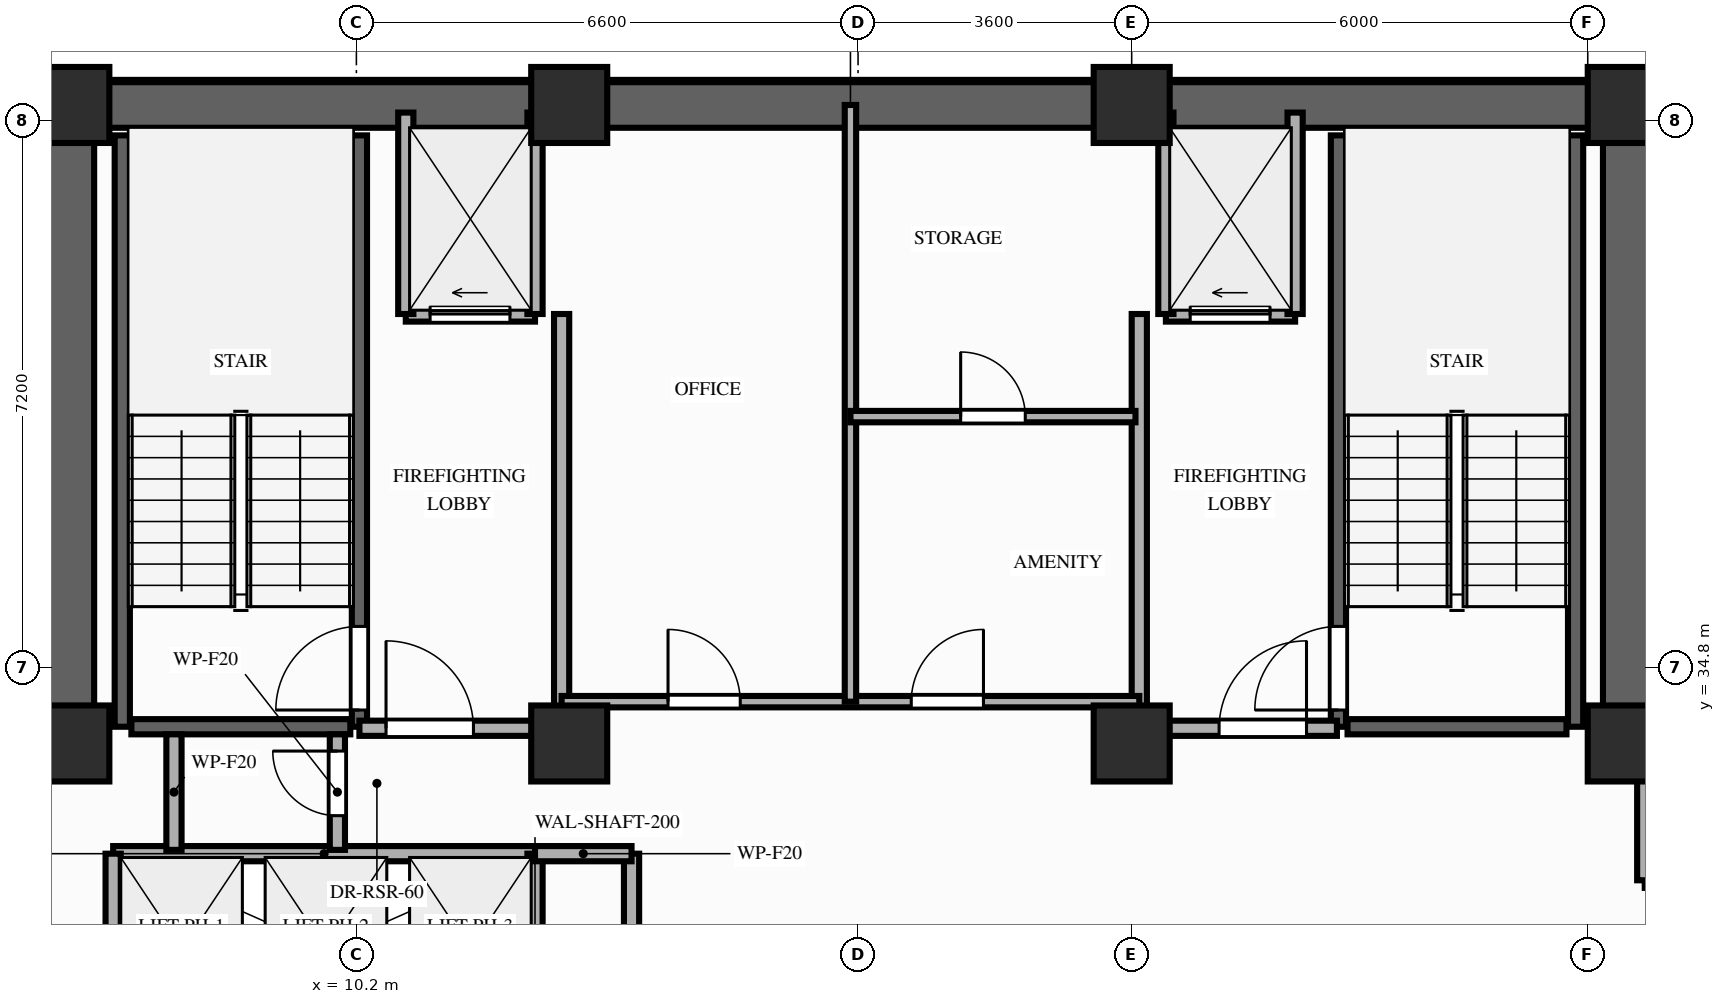
"""IFC4 building model, lengths in metres.
Left out: names, types, materials, properties, quantities, classifications, styles, units other than length and angle.
Written with IfcOpenShell. Run it as: python <this file> out.ifc"""

import sys

from ifc_helpers import new_model, si_unit, direction, frame, frame_2d, origin, origin_2d, place, context, subcontext, project, spatial, rectangle, extrude, element, fill, save


model = new_model("IFC4")
c1 = context("Model", 3, precision=1e-05, world=origin(), true_north=direction((0.0, 1.0)))
c2 = subcontext(c1, "Body", "Model", "MODEL_VIEW")
j1 = project(units=[si_unit("LENGTHUNIT", "METRE"), si_unit("PLANEANGLEUNIT", "RADIAN")], contexts=[c1])
p1 = place(None, origin())
s1 = spatial("IfcSite", under=j1, at=p1, CompositionType="ELEMENT")
p2 = place(p1, origin())
s2 = spatial("IfcBuilding", under=s1, at=p2, CompositionType="ELEMENT")
p3 = place(p2, frame((0.0, 0.0, 188.8)))
s3 = spatial("IfcBuildingStorey", under=s2, at=p3, CompositionType="ELEMENT", Elevation=188.8)
for number, where, z_axis, x_axis in (
    (1, (6.45, 33.8, 0.0), (0.0, 0.0, 1.0), (1.0, 0.0, 0.0)),
    (2, (13.0, 33.8, 0.0), (0.0, 0.0, 1.0), (1.0, 0.0, 0.0)),
    (3, (20.4, 33.8, 0.0), (0.0, 0.0, 1.0), (1.0, 0.0, 0.0)),
    (4, (26.9, 33.8, 0.0), (0.0, 0.0, 1.0), (1.0, 0.0, 0.0)),
    (5, (6.45, 42.2, 0.0), (0.0, 0.0, 1.0), (1.0, 0.0, 0.0)),
    (6, (13.0, 42.2, 0.0), (0.0, 0.0, 1.0), (1.0, 0.0, 0.0)),
    (7, (20.4, 42.2, 0.0), (0.0, 0.0, 1.0), (1.0, 0.0, 0.0)),
    (8, (26.9, 42.2, 0.0), (0.0, 0.0, 1.0), (1.0, 0.0, 0.0)),
):
    element("IfcColumn", number, at=place(p3, frame(where, z_axis=z_axis, x_axis=x_axis)), inside=s3, PredefinedType="COLUMN", context=c2, shape_type="SweptSolid", body=[
        extrude(rectangle(XDim=1.0, YDim=1.0, at=origin_2d()), origin(), (0.0, 0.0, 1.0), 3.2),
    ])
p4 = place(p3, frame((6.45, 42.2, 0.0), z_axis=(0.0, 0.0, 1.0), x_axis=(1.0, 0.0, 0.0)))
e9 = element("IfcWall", 9, at=p4, inside=s3, PredefinedType="SHEAR", context=c2, shape_type="SweptSolid", body=[
    extrude(rectangle(XDim=20.45, YDim=0.6, at=frame_2d((10.225, 0.0))), origin(), (0.0, 0.0, 1.0), 3.02),
])
for number, where, z_axis, x_axis in (
    (10, (6.45, 33.8, 0.0), (0.0, 0.0, 1.0), (0.0, 1.0, 0.0)),
    (11, (26.9, 33.8, 0.0), (0.0, 0.0, 1.0), (0.0, 1.0, 0.0)),
):
    element("IfcWall", number, at=place(p3, frame(where, z_axis=z_axis, x_axis=x_axis)), inside=s3, PredefinedType="SHEAR", context=c2, shape_type="SweptSolid", body=[
        extrude(rectangle(XDim=7.95, YDim=0.6, at=frame_2d((3.975, 0.0))), origin(), (0.0, 0.0, 1.0), 3.02),
    ])
p5 = place(p3, frame((7.12, 34.02, 0.0), z_axis=(0.0, 0.0, 1.0), x_axis=(0.0, 1.0, 0.0)))
e12 = element("IfcWall", 12, at=p5, inside=s3, PredefinedType="SHEAR", context=c2, shape_type="SweptSolid", body=[
    extrude(rectangle(XDim=7.78, YDim=0.2, at=frame_2d((3.89, 0.0))), origin(), (0.0, 0.0, 1.0), 3.02),
])
p6 = place(p3, frame((10.24, 34.02, 0.0), z_axis=(0.0, 0.0, 1.0), x_axis=(0.0, 1.0, 0.0)))
e13 = element("IfcWall", 13, at=p6, inside=s3, PredefinedType="SHEAR", context=c2, shape_type="SweptSolid", body=[
    extrude(rectangle(XDim=7.78, YDim=0.2, at=frame_2d((3.89, 0.0))), origin(), (0.0, 0.0, 1.0), 3.02),
])
p7 = place(p6, frame((0.22, 0.0, 0.0)))
e14 = element("IfcOpeningElement", 14, at=p7, cuts=e13, PredefinedType="OPENING", context=c2, shape_type="SweptSolid", body=[
    extrude(rectangle(XDim=1.1, YDim=2.15, at=frame_2d((0.55, 1.075))), frame((0.0, 0.11, 0.0), z_axis=(0.0, -1.0, 0.0), x_axis=(1.0, 0.0, 0.0)), (0.0, 0.0, 1.0), 0.22),
])
p8 = place(p3, frame((7.24, 34.02, 0.0), z_axis=(0.0, 0.0, 1.0), x_axis=(1.0, 0.0, 0.0)))
e15 = element("IfcWall", 15, at=p8, inside=s3, PredefinedType="SHEAR", context=c2, shape_type="SweptSolid", body=[
    extrude(rectangle(XDim=2.88, YDim=0.2, at=frame_2d((1.44, 0.0))), origin(), (0.0, 0.0, 1.0), 3.02),
])
p9 = place(p3, frame((23.12, 34.02, 0.0), z_axis=(0.0, 0.0, 1.0), x_axis=(0.0, 1.0, 0.0)))
e16 = element("IfcWall", 16, at=p9, inside=s3, PredefinedType="SHEAR", context=c2, shape_type="SweptSolid", body=[
    extrude(rectangle(XDim=7.78, YDim=0.2, at=frame_2d((3.89, 0.0))), origin(), (0.0, 0.0, 1.0), 3.02),
])
p10 = place(p9, frame((0.22, 0.0, 0.0)))
e17 = element("IfcOpeningElement", 17, at=p10, cuts=e16, PredefinedType="OPENING", context=c2, shape_type="SweptSolid", body=[
    extrude(rectangle(XDim=1.1, YDim=2.15, at=frame_2d((0.55, 1.075))), frame((0.0, 0.11, 0.0), z_axis=(0.0, -1.0, 0.0), x_axis=(1.0, 0.0, 0.0)), (0.0, 0.0, 1.0), 0.22),
])
p11 = place(p3, frame((26.24, 34.02, 0.0), z_axis=(0.0, 0.0, 1.0), x_axis=(0.0, 1.0, 0.0)))
e18 = element("IfcWall", 18, at=p11, inside=s3, PredefinedType="SHEAR", context=c2, shape_type="SweptSolid", body=[
    extrude(rectangle(XDim=7.78, YDim=0.2, at=frame_2d((3.89, 0.0))), origin(), (0.0, 0.0, 1.0), 3.02),
])
p12 = place(p3, frame((23.24, 34.02, 0.0), z_axis=(0.0, 0.0, 1.0), x_axis=(1.0, 0.0, 0.0)))
e19 = element("IfcWall", 19, at=p12, inside=s3, PredefinedType="SHEAR", context=c2, shape_type="SweptSolid", body=[
    extrude(rectangle(XDim=2.88, YDim=0.2, at=frame_2d((1.44, 0.0))), origin(), (0.0, 0.0, 1.0), 3.02),
])
p13 = place(p3, frame((7.0, 32.35, 0.0), z_axis=(0.0, 0.0, 1.0), x_axis=(1.0, 0.0, 0.0)))
e20 = element("IfcWall", 20, at=p13, inside=s3, PredefinedType="MOVABLE", context=c2, shape_type="SweptSolid", body=[
    extrude(rectangle(XDim=5.55, YDim=0.2, at=frame_2d((2.775, 0.0))), origin(), (0.0, 0.0, 1.0), 3.02),
])
for number, where, z_axis, x_axis in (
    (21, (7.0, 29.85, 0.0), (0.0, 0.0, 1.0), (0.0, 1.0, 0.0)),
    (22, (12.55, 29.85, 0.0), (0.0, 0.0, 1.0), (0.0, 1.0, 0.0)),
):
    element("IfcWall", number, at=place(p3, frame(where, z_axis=z_axis, x_axis=x_axis)), inside=s3, PredefinedType="MOVABLE", context=c2, shape_type="SweptSolid", body=[
        extrude(rectangle(XDim=2.5, YDim=0.2, at=frame_2d((1.25, 0.0))), origin(), (0.0, 0.0, 1.0), 3.02),
    ])
p14 = place(p3, frame((10.85, 39.45, 0.0), z_axis=(0.0, 0.0, 1.0), x_axis=(1.0, 0.0, 0.0)))
e23 = element("IfcWall", 23, at=p14, inside=s3, PredefinedType="MOVABLE", context=c2, shape_type="SweptSolid", body=[
    extrude(rectangle(XDim=1.7, YDim=0.2, at=frame_2d((0.85, 0.0))), origin(), (0.0, 0.0, 1.0), 3.02),
])
p15 = place(p14, frame((0.32, 0.0, 0.0)))
e24 = element("IfcOpeningElement", 24, at=p15, cuts=e23, PredefinedType="OPENING", context=c2, shape_type="SweptSolid", body=[
    extrude(rectangle(XDim=1.05, YDim=2.15, at=frame_2d((0.525, 1.075))), frame((0.0, 0.11, 0.0), z_axis=(0.0, -1.0, 0.0), x_axis=(1.0, 0.0, 0.0)), (0.0, 0.0, 1.0), 0.22),
])
p16 = place(p3, frame((20.85, 39.45, 0.0), z_axis=(0.0, 0.0, 1.0), x_axis=(1.0, 0.0, 0.0)))
e25 = element("IfcWall", 25, at=p16, inside=s3, PredefinedType="MOVABLE", context=c2, shape_type="SweptSolid", body=[
    extrude(rectangle(XDim=1.7, YDim=0.2, at=frame_2d((0.85, 0.0))), origin(), (0.0, 0.0, 1.0), 3.02),
])
p17 = place(p16, frame((0.32, 0.0, 0.0)))
e26 = element("IfcOpeningElement", 26, at=p17, cuts=e25, PredefinedType="OPENING", context=c2, shape_type="SweptSolid", body=[
    extrude(rectangle(XDim=1.05, YDim=2.15, at=frame_2d((0.525, 1.075))), frame((0.0, 0.11, 0.0), z_axis=(0.0, -1.0, 0.0), x_axis=(1.0, 0.0, 0.0)), (0.0, 0.0, 1.0), 0.22),
])
for number, where, z_axis, x_axis in (
    (27, (10.85, 39.45, 0.0), (0.0, 0.0, 1.0), (0.0, 1.0, 0.0)),
    (28, (12.55, 39.45, 0.0), (0.0, 0.0, 1.0), (0.0, 1.0, 0.0)),
):
    element("IfcWall", number, at=place(p3, frame(where, z_axis=z_axis, x_axis=x_axis)), inside=s3, PredefinedType="MOVABLE", context=c2, shape_type="SweptSolid", body=[
        extrude(rectangle(XDim=2.65, YDim=0.2, at=frame_2d((1.325, 0.0))), origin(), (0.0, 0.0, 1.0), 2.51),
    ])
p18 = place(p3, frame((12.9, 34.0, 0.0), z_axis=(0.0, 0.0, 1.0), x_axis=(0.0, 1.0, 0.0)))
e29 = element("IfcWall", 29, at=p18, inside=s3, PredefinedType="PARTITIONING", context=c2, shape_type="SweptSolid", body=[
    extrude(rectangle(XDim=5.45, YDim=0.2, at=frame_2d((2.725, 0.0))), origin(), (0.0, 0.0, 1.0), 2.51),
])
p19 = place(p3, frame((10.24, 34.0, 0.0), z_axis=(0.0, 0.0, 1.0), x_axis=(1.0, 0.0, 0.0)))
e30 = element("IfcWall", 30, at=p19, inside=s3, PredefinedType="PARTITIONING", context=c2, shape_type="SweptSolid", body=[
    extrude(rectangle(XDim=2.66, YDim=0.2, at=frame_2d((1.33, 0.0))), origin(), (0.0, 0.0, 1.0), 2.51),
])
p20 = place(p19, frame((0.35, 0.0, 0.0)))
e31 = element("IfcOpeningElement", 31, at=p20, cuts=e30, PredefinedType="OPENING", context=c2, shape_type="SweptSolid", body=[
    extrude(rectangle(XDim=1.15, YDim=2.15, at=frame_2d((0.575, 1.075))), frame((0.0, 0.11, 0.0), z_axis=(0.0, -1.0, 0.0), x_axis=(1.0, 0.0, 0.0)), (0.0, 0.0, 1.0), 0.22),
])
for number, where, z_axis, x_axis in (
    (32, (20.85, 39.45, 0.0), (0.0, 0.0, 1.0), (0.0, 1.0, 0.0)),
    (33, (22.55, 39.45, 0.0), (0.0, 0.0, 1.0), (0.0, 1.0, 0.0)),
):
    element("IfcWall", number, at=place(p3, frame(where, z_axis=z_axis, x_axis=x_axis)), inside=s3, PredefinedType="MOVABLE", context=c2, shape_type="SweptSolid", body=[
        extrude(rectangle(XDim=2.65, YDim=0.2, at=frame_2d((1.325, 0.0))), origin(), (0.0, 0.0, 1.0), 2.51),
    ])
p21 = place(p3, frame((20.5, 34.0, 0.0), z_axis=(0.0, 0.0, 1.0), x_axis=(0.0, 1.0, 0.0)))
e34 = element("IfcWall", 34, at=p21, inside=s3, PredefinedType="PARTITIONING", context=c2, shape_type="SweptSolid", body=[
    extrude(rectangle(XDim=5.45, YDim=0.2, at=frame_2d((2.725, 0.0))), origin(), (0.0, 0.0, 1.0), 2.51),
])
p22 = place(p3, frame((20.5, 34.0, 0.0), z_axis=(0.0, 0.0, 1.0), x_axis=(1.0, 0.0, 0.0)))
e35 = element("IfcWall", 35, at=p22, inside=s3, PredefinedType="PARTITIONING", context=c2, shape_type="SweptSolid", body=[
    extrude(rectangle(XDim=2.6, YDim=0.2, at=frame_2d((1.3, 0.0))), origin(), (0.0, 0.0, 1.0), 2.51),
])
p23 = place(p22, frame((1.05, 0.0, 0.0)))
e36 = element("IfcOpeningElement", 36, at=p23, cuts=e35, PredefinedType="OPENING", context=c2, shape_type="SweptSolid", body=[
    extrude(rectangle(XDim=1.15, YDim=2.15, at=frame_2d((0.575, 1.075))), frame((0.0, 0.11, 0.0), z_axis=(0.0, -1.0, 0.0), x_axis=(1.0, 0.0, 0.0)), (0.0, 0.0, 1.0), 0.22),
])
p24 = place(p3, frame((13.82, 29.85, 0.0), z_axis=(0.0, 0.0, 1.0), x_axis=(0.0, 1.0, 0.0)))
e37 = element("IfcWall", 37, at=p24, inside=s3, PredefinedType="PARTITIONING", context=c2, shape_type="SweptSolid", body=[
    extrude(rectangle(XDim=2.5, YDim=0.2, at=frame_2d((1.25, 0.0))), origin(), (0.0, 0.0, 1.0), 3.02),
])
p25 = place(p3, frame((12.55, 32.35, 0.0), z_axis=(0.0, 0.0, 1.0), x_axis=(1.0, 0.0, 0.0)))
e38 = element("IfcWall", 38, at=p25, inside=s3, PredefinedType="PARTITIONING", context=c2, shape_type="SweptSolid", body=[
    extrude(rectangle(XDim=1.27, YDim=0.2, at=frame_2d((0.635, 0.0))), origin(), (0.0, 0.0, 1.0), 3.02),
])
p26 = place(p3, frame((7.8, 32.4, 0.0), z_axis=(0.0, 0.0, 1.0), x_axis=(0.0, 1.0, 0.0)))
e39 = element("IfcWall", 39, at=p26, inside=s3, PredefinedType="PARTITIONING", context=c2, shape_type="SweptSolid", body=[
    extrude(rectangle(XDim=1.52, YDim=0.2, at=frame_2d((0.76, 0.0))), origin(), (0.0, 0.0, 1.0), 2.51),
])
p27 = place(p3, frame((9.95, 32.4, 0.0), z_axis=(0.0, 0.0, 1.0), x_axis=(0.0, 1.0, 0.0)))
e40 = element("IfcWall", 40, at=p27, inside=s3, PredefinedType="PARTITIONING", context=c2, shape_type="SweptSolid", body=[
    extrude(rectangle(XDim=1.52, YDim=0.2, at=frame_2d((0.76, 0.0))), origin(), (0.0, 0.0, 1.0), 2.51),
])
p28 = place(p27, frame((0.45, 0.0, 0.0)))
e41 = element("IfcOpeningElement", 41, at=p28, cuts=e40, PredefinedType="OPENING", context=c2, shape_type="SweptSolid", body=[
    extrude(rectangle(XDim=0.85, YDim=2.05, at=frame_2d((0.425, 1.025))), frame((0.0, 0.11, 0.0), z_axis=(0.0, -1.0, 0.0), x_axis=(1.0, 0.0, 0.0)), (0.0, 0.0, 1.0), 0.22),
])
p29 = place(p3, frame((12.9, 34.35, 0.0), z_axis=(0.0, 0.0, 1.0), x_axis=(1.0, 0.0, 0.0)))
e42 = element("IfcWall", 42, at=p29, inside=s3, PredefinedType="PARTITIONING", context=c2, shape_type="SweptSolid", body=[
    extrude(rectangle(XDim=7.6, YDim=0.15, at=frame_2d((3.8, 0.0))), origin(), (0.0, 0.0, 1.0), 3.02),
])
p30 = place(p29, frame((1.4, 0.0, 0.0)))
e43 = element("IfcOpeningElement", 43, at=p30, cuts=e42, PredefinedType="OPENING", context=c2, shape_type="SweptSolid", body=[
    extrude(rectangle(XDim=0.95, YDim=2.15, at=frame_2d((0.475, 1.075))), frame((0.0, 0.085, 0.0), z_axis=(0.0, -1.0, 0.0), x_axis=(1.0, 0.0, 0.0)), (0.0, 0.0, 1.0), 0.17),
])
p31 = place(p29, frame((4.6, 0.0, 0.0)))
e44 = element("IfcOpeningElement", 44, at=p31, cuts=e42, PredefinedType="OPENING", context=c2, shape_type="SweptSolid", body=[
    extrude(rectangle(XDim=0.95, YDim=2.15, at=frame_2d((0.475, 1.075))), frame((0.0, 0.085, 0.0), z_axis=(0.0, -1.0, 0.0), x_axis=(1.0, 0.0, 0.0)), (0.0, 0.0, 1.0), 0.17),
])
p32 = place(p3, frame((16.7, 34.35, 0.0), z_axis=(0.0, 0.0, 1.0), x_axis=(0.0, 1.0, 0.0)))
e45 = element("IfcWall", 45, at=p32, inside=s3, PredefinedType="PARTITIONING", context=c2, shape_type="SweptSolid", body=[
    extrude(rectangle(XDim=7.85, YDim=0.15, at=frame_2d((3.925, 0.0))), origin(), (0.0, 0.0, 1.0), 2.51),
])
p33 = place(p3, frame((16.7, 38.1, 0.0), z_axis=(0.0, 0.0, 1.0), x_axis=(1.0, 0.0, 0.0)))
e46 = element("IfcWall", 46, at=p33, inside=s3, PredefinedType="PARTITIONING", context=c2, shape_type="SweptSolid", body=[
    extrude(rectangle(XDim=3.75, YDim=0.15, at=frame_2d((1.875, 0.0))), origin(), (0.0, 0.0, 1.0), 3.02),
])
p34 = place(p33, frame((1.45, 0.0, 0.0)))
e47 = element("IfcOpeningElement", 47, at=p34, cuts=e46, PredefinedType="OPENING", context=c2, shape_type="SweptSolid", body=[
    extrude(rectangle(XDim=0.85, YDim=2.05, at=frame_2d((0.425, 1.025))), frame((0.0, 0.085, 0.0), z_axis=(0.0, -1.0, 0.0), x_axis=(1.0, 0.0, 0.0)), (0.0, 0.0, 1.0), 0.17),
])
p35 = place(p3, frame((27.15, 32.0, 0.0), z_axis=(0.0, 0.0, 1.0), x_axis=(1.0, 0.0, 0.0)))
e48 = element("IfcWall", 48, at=p35, inside=s3, PredefinedType="PARTITIONING", context=c2, shape_type="SweptSolid", body=[
    extrude(rectangle(XDim=9.45, YDim=0.2, at=frame_2d((4.725, 0.0))), origin(), (0.0, 0.0, 1.0), 2.51),
])
p36 = place(p35, frame((4.25, 0.0, 0.0)))
e49 = element("IfcOpeningElement", 49, at=p36, cuts=e48, PredefinedType="OPENING", context=c2, shape_type="SweptSolid", body=[
    extrude(rectangle(XDim=0.95, YDim=2.15, at=frame_2d((0.475, 1.075))), frame((0.0, 0.11, 0.0), z_axis=(0.0, -1.0, 0.0), x_axis=(1.0, 0.0, 0.0)), (0.0, 0.0, 1.0), 0.22),
])
p37 = place(p3, frame((27.15, 32.0, 0.0), z_axis=(0.0, 0.0, 1.0), x_axis=(0.0, 1.0, 0.0)))
e50 = element("IfcWall", 50, at=p37, inside=s3, PredefinedType="PARTITIONING", context=c2, shape_type="SweptSolid", body=[
    extrude(rectangle(XDim=1.68, YDim=0.2, at=frame_2d((0.84, 0.0))), origin(), (0.0, 0.0, 1.0), 2.51),
])
p38 = place(p7, origin())
e51 = element("IfcDoor", 51, at=p38, inside=s3, OperationType="SINGLE_SWING_LEFT", PredefinedType="DOOR", context=c2, shape_type="SweptSolid", body=[
    extrude(rectangle(XDim=1.1, YDim=2.15, at=frame_2d((0.55, 1.075))), frame((0.0, 0.025, 0.0), z_axis=(0.0, -1.0, 0.0), x_axis=(1.0, 0.0, 0.0)), (0.0, 0.0, 1.0), 0.05),
])
fill(e14, e51)
p39 = place(p10, origin())
e52 = element("IfcDoor", 52, at=p39, inside=s3, OperationType="SINGLE_SWING_LEFT", PredefinedType="DOOR", context=c2, shape_type="SweptSolid", body=[
    extrude(rectangle(XDim=1.1, YDim=2.15, at=frame_2d((0.55, 1.075))), frame((0.0, 0.025, 0.0), z_axis=(0.0, -1.0, 0.0), x_axis=(1.0, 0.0, 0.0)), (0.0, 0.0, 1.0), 0.05),
])
fill(e17, e52)
p40 = place(p15, origin())
e53 = element("IfcDoor", 53, at=p40, inside=s3, OperationType="SLIDING_TO_LEFT", PredefinedType="DOOR", context=c2, shape_type="SweptSolid", body=[
    extrude(rectangle(XDim=1.05, YDim=2.15, at=frame_2d((0.525, 1.075))), frame((0.0, 0.025, 0.0), z_axis=(0.0, -1.0, 0.0), x_axis=(1.0, 0.0, 0.0)), (0.0, 0.0, 1.0), 0.05),
])
fill(e24, e53)
p41 = place(p17, origin())
e54 = element("IfcDoor", 54, at=p41, inside=s3, OperationType="SLIDING_TO_LEFT", PredefinedType="DOOR", context=c2, shape_type="SweptSolid", body=[
    extrude(rectangle(XDim=1.05, YDim=2.15, at=frame_2d((0.525, 1.075))), frame((0.0, 0.025, 0.0), z_axis=(0.0, -1.0, 0.0), x_axis=(1.0, 0.0, 0.0)), (0.0, 0.0, 1.0), 0.05),
])
fill(e26, e54)
p42 = place(p20, origin())
e55 = element("IfcDoor", 55, at=p42, inside=s3, OperationType="SINGLE_SWING_LEFT", PredefinedType="DOOR", context=c2, shape_type="SweptSolid", body=[
    extrude(rectangle(XDim=1.15, YDim=2.15, at=frame_2d((0.575, 1.075))), frame((0.0, 0.025, 0.0), z_axis=(0.0, -1.0, 0.0), x_axis=(1.0, 0.0, 0.0)), (0.0, 0.0, 1.0), 0.05),
])
fill(e31, e55)
p43 = place(p23, origin())
e56 = element("IfcDoor", 56, at=p43, inside=s3, OperationType="SINGLE_SWING_RIGHT", PredefinedType="DOOR", context=c2, shape_type="SweptSolid", body=[
    extrude(rectangle(XDim=1.15, YDim=2.15, at=frame_2d((0.575, 1.075))), frame((0.0, 0.025, 0.0), z_axis=(0.0, -1.0, 0.0), x_axis=(1.0, 0.0, 0.0)), (0.0, 0.0, 1.0), 0.05),
])
fill(e36, e56)
p44 = place(p28, origin())
e57 = element("IfcDoor", 57, at=p44, inside=s3, OperationType="SINGLE_SWING_RIGHT", PredefinedType="DOOR", context=c2, shape_type="SweptSolid", body=[
    extrude(rectangle(XDim=0.85, YDim=2.05, at=frame_2d((0.425, 1.025))), frame((0.0, 0.025, 0.0), z_axis=(0.0, -1.0, 0.0), x_axis=(1.0, 0.0, 0.0)), (0.0, 0.0, 1.0), 0.05),
])
fill(e41, e57)
p45 = place(p30, origin())
e58 = element("IfcDoor", 58, at=p45, inside=s3, OperationType="SINGLE_SWING_LEFT", PredefinedType="DOOR", context=c2, shape_type="SweptSolid", body=[
    extrude(rectangle(XDim=0.95, YDim=2.15, at=frame_2d((0.475, 1.075))), frame((0.0, 0.025, 0.0), z_axis=(0.0, -1.0, 0.0), x_axis=(1.0, 0.0, 0.0)), (0.0, 0.0, 1.0), 0.05),
])
fill(e43, e58)
p46 = place(p31, origin())
e59 = element("IfcDoor", 59, at=p46, inside=s3, OperationType="SINGLE_SWING_RIGHT", PredefinedType="DOOR", context=c2, shape_type="SweptSolid", body=[
    extrude(rectangle(XDim=0.95, YDim=2.15, at=frame_2d((0.475, 1.075))), frame((0.0, 0.025, 0.0), z_axis=(0.0, -1.0, 0.0), x_axis=(1.0, 0.0, 0.0)), (0.0, 0.0, 1.0), 0.05),
])
fill(e44, e59)
p47 = place(p34, origin())
e60 = element("IfcDoor", 60, at=p47, inside=s3, OperationType="SINGLE_SWING_LEFT", PredefinedType="DOOR", context=c2, shape_type="SweptSolid", body=[
    extrude(rectangle(XDim=0.85, YDim=2.05, at=frame_2d((0.425, 1.025))), frame((0.0, 0.025, 0.0), z_axis=(0.0, -1.0, 0.0), x_axis=(1.0, 0.0, 0.0)), (0.0, 0.0, 1.0), 0.05),
])
fill(e47, e60)
save(model, sys.argv[1])
